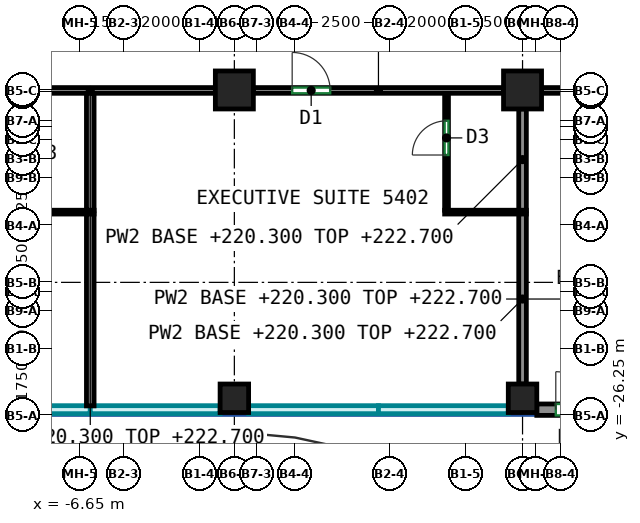
"""IFC4 building model, lengths in metres.
Left out: names, types, materials, properties, quantities, classifications, styles, units other than length and angle.
Written with IfcOpenShell. Run it as: python <this file> out.ifc"""

import sys

from ifc_helpers import new_model, si_unit, direction, frame, frame_2d, origin, origin_2d, place, context, subcontext, project, spatial, rectangle, extrude, source, transform, mapped, element, fill, save


model = new_model("IFC4")
c1 = context("Model", 3, precision=1e-05, world=origin(), true_north=direction((0.0, 1.0)))
c2 = subcontext(c1, "Body", "Model", "MODEL_VIEW")
j1 = project(units=[si_unit("LENGTHUNIT", "METRE"), si_unit("PLANEANGLEUNIT", "RADIAN")], contexts=[c1])
p1 = place(None, origin())
s1 = spatial("IfcSite", under=j1, at=p1, CompositionType="ELEMENT")
p2 = place(p1, origin())
s2 = spatial("IfcBuilding", under=s1, at=p2, CompositionType="ELEMENT")
p3 = place(p2, frame((0.0, 0.0, 220.3)))
s3 = spatial("IfcBuildingStorey", under=s2, at=p3, CompositionType="ELEMENT", Elevation=220.3)
m1 = source(origin(), c2, "Body", "SweptSolid", [
    extrude(rectangle(XDim=0.75, YDim=0.75, at=origin_2d()), origin(), (0.0, 0.0, 1.0), 3.0),
])
p4 = place(p3, frame((-2.583, -25.8, 0.0), z_axis=(0.0, 0.0, 1.0), x_axis=(1.0, 0.0, 0.0)))
e1 = element("IfcColumn", 1, at=p4, inside=s3, PredefinedType="COLUMN", context=c2, shape_type="MappedRepresentation", body=[
    mapped(m1, transform((0.0, 0.0, 0.0))),
])
m2 = source(origin(), c2, "Body", "SweptSolid", [
    extrude(rectangle(XDim=1.0, YDim=1.0, at=origin_2d()), origin(), (0.0, 0.0, 1.0), 3.0),
])
p5 = place(p3, frame((-2.583, -17.688, 0.0), z_axis=(0.0, 0.0, 1.0), x_axis=(1.0, 0.0, 0.0)))
e2 = element("IfcColumn", 2, at=p5, inside=s3, PredefinedType="COLUMN", context=c2, shape_type="MappedRepresentation", body=[
    mapped(m2, transform((0.0, 0.0, 0.0))),
])
p6 = place(p3, frame((5.0, -25.8, 0.0), z_axis=(0.0, 0.0, 1.0), x_axis=(1.0, 0.0, 0.0)))
e3 = element("IfcColumn", 3, at=p6, inside=s3, PredefinedType="COLUMN", context=c2, shape_type="MappedRepresentation", body=[
    mapped(m1, transform((0.0, 0.0, 0.0))),
])
p7 = place(p3, frame((5.0, -17.688, 0.0), z_axis=(0.0, 0.0, 1.0), x_axis=(1.0, 0.0, 0.0)))
e4 = element("IfcColumn", 4, at=p7, inside=s3, PredefinedType="COLUMN", context=c2, shape_type="MappedRepresentation", body=[
    mapped(m2, transform((0.0, 0.0, 0.0))),
])
m3 = source(origin(), c2, "Body", "SweptSolid", [
    extrude(rectangle(XDim=2.0, YDim=0.3, at=frame_2d((1.0, 0.0))), origin(), (0.0, 0.0, 1.0), 3.0),
])
p8 = place(p3, frame((5.375, -26.1, 0.0), z_axis=(0.0, 0.0, 1.0), x_axis=(1.0, 0.0, 0.0)))
e5 = element("IfcWall", 5, at=p8, inside=s3, PredefinedType="SOLIDWALL", context=c2, shape_type="MappedRepresentation", body=[
    mapped(m3, transform((0.0, 0.0, 0.0))),
])
p9 = place(p8, frame((0.5, 0.0, 0.0)))
e6 = element("IfcOpeningElement", 6, at=p9, cuts=e5, PredefinedType="OPENING", context=c2, shape_type="SweptSolid", body=[
    extrude(rectangle(XDim=1.0, YDim=2.1, at=frame_2d((0.5, 1.05))), frame((0.0, 0.16, 0.0), z_axis=(0.0, -1.0, 0.0), x_axis=(1.0, 0.0, 0.0)), (0.0, 0.0, 1.0), 0.32),
])
p10 = place(p3, frame((-9.667, -17.7, 0.0), z_axis=(0.0, 0.0, 1.0), x_axis=(1.0, 0.0, 0.0)))
e7 = element("IfcWall", 7, at=p10, inside=s3, PredefinedType="PARTITIONING", context=c2, shape_type="SweptSolid", body=[
    extrude(rectangle(XDim=6.584, YDim=0.15, at=frame_2d((3.292, 0.0))), origin(), (0.0, 0.0, 1.0), 2.4),
])
p11 = place(p3, frame((-2.083, -17.7, 0.0), z_axis=(0.0, 0.0, 1.0), x_axis=(1.0, 0.0, 0.0)))
e8 = element("IfcWall", 8, at=p11, inside=s3, PredefinedType="PARTITIONING", context=c2, shape_type="SweptSolid", body=[
    extrude(rectangle(XDim=6.583, YDim=0.15, at=frame_2d((3.292, 0.0))), origin(), (0.0, 0.0, 1.0), 2.4),
])
p12 = place(p11, frame((1.021, 0.0, 0.0)))
e9 = element("IfcOpeningElement", 9, at=p12, cuts=e8, PredefinedType="OPENING", context=c2, shape_type="SweptSolid", body=[
    extrude(rectangle(XDim=1.0, YDim=2.1, at=frame_2d((0.5, 1.05))), frame((0.0, 0.085, 0.0), z_axis=(0.0, -1.0, 0.0), x_axis=(1.0, 0.0, 0.0)), (0.0, 0.0, 1.0), 0.17),
])
p13 = place(p3, frame((5.5, -17.7, 0.0), z_axis=(0.0, 0.0, 1.0), x_axis=(1.0, 0.0, 0.0)))
e10 = element("IfcWall", 10, at=p13, inside=s3, PredefinedType="PARTITIONING", context=c2, shape_type="SweptSolid", body=[
    extrude(rectangle(XDim=6.583, YDim=0.15, at=frame_2d((3.292, 0.0))), origin(), (0.0, 0.0, 1.0), 2.4),
])
p14 = place(p13, frame((2.765, 0.0, 0.0)))
e11 = element("IfcOpeningElement", 11, at=p14, cuts=e10, PredefinedType="OPENING", context=c2, shape_type="SweptSolid", body=[
    extrude(rectangle(XDim=1.0, YDim=2.1, at=frame_2d((0.5, 1.05))), frame((0.0, 0.085, 0.0), z_axis=(0.0, -1.0, 0.0), x_axis=(1.0, 0.0, 0.0)), (0.0, 0.0, 1.0), 0.17),
])
p15 = place(p3, frame((-8.425, -20.902, 0.0), z_axis=(0.0, 0.0, 1.0), x_axis=(1.0, 0.0, 0.0)))
e12 = element("IfcWall", 12, at=p15, inside=s3, PredefinedType="PARTITIONING", context=c2, shape_type="SweptSolid", body=[
    extrude(rectangle(XDim=2.15, YDim=0.1, at=frame_2d((1.075, 0.0))), origin(), (0.0, 0.0, 1.0), 3.0),
])
p16 = place(p3, frame((-6.375, -26.0, 0.0), z_axis=(0.0, 0.0, 1.0), x_axis=(0.0, 1.0, 0.0)))
e13 = element("IfcWall", 13, at=p16, inside=s3, PredefinedType="PARTITIONING", context=c2, shape_type="SweptSolid", body=[
    extrude(rectangle(XDim=5.048, YDim=0.2, at=frame_2d((2.524, 0.0))), origin(), (0.0, 0.0, 1.0), 3.0),
])
p17 = place(p3, frame((-6.375, -20.852, 0.0), z_axis=(0.0, 0.0, 1.0), x_axis=(0.0, 1.0, 0.0)))
e14 = element("IfcWall", 14, at=p17, inside=s3, PredefinedType="PARTITIONING", context=c2, shape_type="SweptSolid", body=[
    extrude(rectangle(XDim=3.075, YDim=0.2, at=frame_2d((1.538, 0.0))), origin(), (0.0, 0.0, 1.0), 3.0),
])
p18 = place(p3, frame((3.0, -20.852, 0.0), z_axis=(0.0, 0.0, 1.0), x_axis=(0.0, 1.0, 0.0)))
e15 = element("IfcWall", 15, at=p18, inside=s3, PredefinedType="PARTITIONING", context=c2, shape_type="SweptSolid", body=[
    extrude(rectangle(XDim=3.075, YDim=0.1, at=frame_2d((1.538, 0.0))), origin(), (0.0, 0.0, 1.0), 3.0),
])
p19 = place(p18, frame((1.453, 0.0, 0.0)))
e16 = element("IfcOpeningElement", 16, at=p19, cuts=e15, PredefinedType="OPENING", context=c2, shape_type="SweptSolid", body=[
    extrude(rectangle(XDim=0.9, YDim=2.1, at=frame_2d((0.45, 1.05))), frame((0.0, 0.06, 0.0), z_axis=(0.0, -1.0, 0.0), x_axis=(1.0, 0.0, 0.0)), (0.0, 0.0, 1.0), 0.12),
])
p20 = place(p3, frame((2.95, -20.902, 0.0), z_axis=(0.0, 0.0, 1.0), x_axis=(1.0, 0.0, 0.0)))
e17 = element("IfcWall", 17, at=p20, inside=s3, PredefinedType="PARTITIONING", context=c2, shape_type="SweptSolid", body=[
    extrude(rectangle(XDim=2.15, YDim=0.1, at=frame_2d((1.075, 0.0))), origin(), (0.0, 0.0, 1.0), 3.0),
])
p21 = place(p3, frame((5.0, -25.425, 0.0), z_axis=(0.0, 0.0, 1.0), x_axis=(0.0, 1.0, 0.0)))
e18 = element("IfcWall", 18, at=p21, inside=s3, PredefinedType="PARTITIONING", context=c2, shape_type="SweptSolid", body=[
    extrude(rectangle(XDim=4.473, YDim=0.2, at=frame_2d((2.237, 0.0))), origin(), (0.0, 0.0, 1.0), 2.4),
])
p22 = place(p3, frame((5.0, -20.852, 0.0), z_axis=(0.0, 0.0, 1.0), x_axis=(0.0, 1.0, 0.0)))
e19 = element("IfcWall", 19, at=p22, inside=s3, PredefinedType="PARTITIONING", context=c2, shape_type="SweptSolid", body=[
    extrude(rectangle(XDim=2.664, YDim=0.2, at=frame_2d((1.332, 0.0))), origin(), (0.0, 0.0, 1.0), 2.4),
])
p23 = place(p9, origin())
e20 = element("IfcDoor", 20, at=p23, inside=s3, OperationType="SINGLE_SWING_LEFT", PredefinedType="DOOR", context=c2, shape_type="SweptSolid", body=[
    extrude(rectangle(XDim=1.0, YDim=2.1, at=frame_2d((0.5, 1.05))), frame((0.0, 0.025, 0.0), z_axis=(0.0, -1.0, 0.0), x_axis=(1.0, 0.0, 0.0)), (0.0, 0.0, 1.0), 0.05),
])
fill(e6, e20)
p24 = place(p19, origin())
e21 = element("IfcDoor", 21, at=p24, inside=s3, OperationType="SINGLE_SWING_LEFT", PredefinedType="DOOR", context=c2, shape_type="SweptSolid", body=[
    extrude(rectangle(XDim=0.9, YDim=2.1, at=frame_2d((0.45, 1.05))), frame((0.0, 0.025, 0.0), z_axis=(0.0, -1.0, 0.0), x_axis=(1.0, 0.0, 0.0)), (0.0, 0.0, 1.0), 0.05),
])
fill(e16, e21)
p25 = place(p12, origin())
e22 = element("IfcDoor", 22, at=p25, inside=s3, OperationType="SINGLE_SWING_LEFT", PredefinedType="DOOR", context=c2, shape_type="SweptSolid", body=[
    extrude(rectangle(XDim=1.0, YDim=2.1, at=frame_2d((0.5, 1.05))), frame((0.0, 0.025, 0.0), z_axis=(0.0, -1.0, 0.0), x_axis=(1.0, 0.0, 0.0)), (0.0, 0.0, 1.0), 0.05),
])
fill(e9, e22)
save(model, sys.argv[1])
